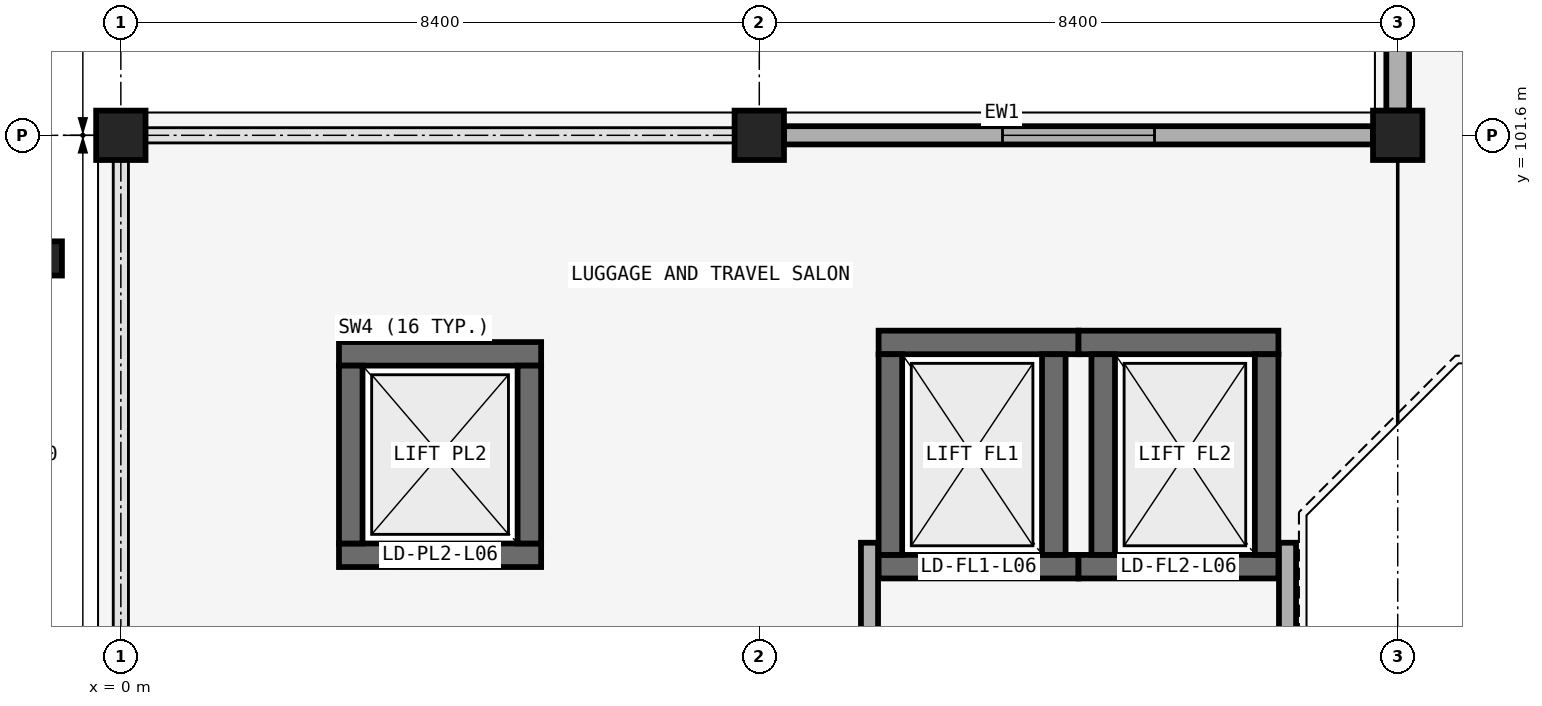
"""IFC4 building model, lengths in metres.
Left out: names, types, materials, properties, quantities, classifications, styles, units other than length and angle.
Written with IfcOpenShell. Run it as: python <this file> out.ifc"""

import sys

from ifc_helpers import new_model, si_unit, direction, frame, frame_2d, origin, origin_2d, place, context, subcontext, project, spatial, rectangle, extrude, element, fill, save


model = new_model("IFC4")
c1 = context("Model", 3, precision=1e-05, world=origin(), true_north=direction((0.0, 1.0)))
c2 = subcontext(c1, "Body", "Model", "MODEL_VIEW")
j1 = project(units=[si_unit("LENGTHUNIT", "METRE"), si_unit("PLANEANGLEUNIT", "RADIAN")], contexts=[c1])
p1 = place(None, origin())
s1 = spatial("IfcSite", under=j1, at=p1, CompositionType="ELEMENT")
p2 = place(p1, origin())
s2 = spatial("IfcBuilding", under=s1, at=p2, CompositionType="ELEMENT")
p3 = place(p2, frame((0.0, 0.0, 27.9)))
s3 = spatial("IfcBuildingStorey", under=s2, at=p3, CompositionType="ELEMENT", Elevation=27.9)
for number, where, z_axis, x_axis in (
    (1, (0.0, 101.6, 0.0), (0.0, 0.0, 1.0), (1.0, 0.0, 0.0)),
    (2, (8.4, 101.6, 0.0), (0.0, 0.0, 1.0), (1.0, 0.0, 0.0)),
    (3, (16.8, 101.6, 0.0), (0.0, 0.0, 1.0), (1.0, 0.0, 0.0)),
):
    element("IfcColumn", number, at=place(p3, frame(where, z_axis=z_axis, x_axis=x_axis)), inside=s3, PredefinedType="COLUMN", context=c2, shape_type="SweptSolid", body=[
        extrude(rectangle(XDim=0.65, YDim=0.65, at=origin_2d()), origin(), (0.0, 0.0, 1.0), 4.5),
    ])
p4 = place(p3, frame((-1.05, 99.98, 0.0), z_axis=(0.0, 0.0, 1.0), x_axis=(0.0, 1.0, 0.0)))
e4 = element("IfcColumn", 4, at=p4, inside=s3, PredefinedType="PILASTER", context=c2, shape_type="SweptSolid", body=[
    extrude(rectangle(XDim=0.45, YDim=0.55, at=origin_2d()), origin(), (0.0, 0.0, 1.0), 4.5),
])
p5 = place(p3, frame((8.725, 101.6, 0.0), z_axis=(0.0, 0.0, 1.0), x_axis=(1.0, 0.0, 0.0)))
e5 = element("IfcWall", 5, at=p5, inside=s3, PredefinedType="SOLIDWALL", context=c2, shape_type="SweptSolid", body=[
    extrude(rectangle(XDim=7.75, YDim=0.24, at=frame_2d((3.875, 0.0))), origin(), (0.0, 0.0, 1.0), 3.45),
])
p6 = place(p5, frame((2.875, 0.0, 0.95)))
e6 = element("IfcOpeningElement", 6, at=p6, cuts=e5, PredefinedType="OPENING", context=c2, shape_type="SweptSolid", body=[
    extrude(rectangle(XDim=2.0, YDim=1.85, at=frame_2d((1.0, 0.925))), frame((0.0, 0.13, 0.0), z_axis=(0.0, -1.0, 0.0), x_axis=(1.0, 0.0, 0.0)), (0.0, 0.0, 1.0), 0.26),
])
p7 = place(p3, frame((16.8, 101.925, 0.0), z_axis=(0.0, 0.0, 1.0), x_axis=(0.0, 1.0, 0.0)))
e7 = element("IfcWall", 7, at=p7, inside=s3, PredefinedType="SOLIDWALL", context=c2, shape_type="SweptSolid", body=[
    extrude(rectangle(XDim=7.75, YDim=0.3, at=frame_2d((3.875, 0.0))), origin(), (0.0, 0.0, 1.0), 3.45),
])
p8 = place(p7, frame((2.8, 0.0, 0.95)))
e8 = element("IfcOpeningElement", 8, at=p8, cuts=e7, PredefinedType="OPENING", context=c2, shape_type="SweptSolid", body=[
    extrude(rectangle(XDim=2.15, YDim=1.6, at=frame_2d((1.075, 0.8))), frame((0.0, 0.16, 0.0), z_axis=(0.0, -1.0, 0.0), x_axis=(1.0, 0.0, 0.0)), (0.0, 0.0, 1.0), 0.32),
])
p9 = place(p3, frame((9.97, 95.925, 0.0), z_axis=(0.0, 0.0, 1.0), x_axis=(1.0, 0.0, 0.0)))
e9 = element("IfcWall", 9, at=p9, inside=s3, PredefinedType="SHEAR", context=c2, shape_type="SweptSolid", body=[
    extrude(rectangle(XDim=2.63, YDim=0.31, at=frame_2d((1.315, 0.0))), origin(), (0.0, 0.0, 1.0), 4.2),
])
p10 = place(p9, frame((0.715, 0.0, 0.0)))
e10 = element("IfcOpeningElement", 10, at=p10, cuts=e9, PredefinedType="OPENING", context=c2, shape_type="SweptSolid", body=[
    extrude(rectangle(XDim=1.2, YDim=2.25, at=frame_2d((0.6, 1.125))), frame((0.0, 0.165, 0.0), z_axis=(0.0, -1.0, 0.0), x_axis=(1.0, 0.0, 0.0)), (0.0, 0.0, 1.0), 0.33),
])
p11 = place(p3, frame((9.97, 98.875, 0.0), z_axis=(0.0, 0.0, 1.0), x_axis=(1.0, 0.0, 0.0)))
e11 = element("IfcWall", 11, at=p11, inside=s3, PredefinedType="SHEAR", context=c2, shape_type="SweptSolid", body=[
    extrude(rectangle(XDim=2.63, YDim=0.31, at=frame_2d((1.315, 0.0))), origin(), (0.0, 0.0, 1.0), 4.2),
])
for number, where, z_axis, x_axis in (
    (12, (10.125, 96.08, 0.0), (0.0, 0.0, 1.0), (0.0, 1.0, 0.0)),
    (13, (12.275, 96.08, 0.0), (0.0, 0.0, 1.0), (0.0, 1.0, 0.0)),
):
    element("IfcWall", number, at=place(p3, frame(where, z_axis=z_axis, x_axis=x_axis)), inside=s3, PredefinedType="SHEAR", context=c2, shape_type="SweptSolid", body=[
        extrude(rectangle(XDim=2.64, YDim=0.31, at=frame_2d((1.32, 0.0))), origin(), (0.0, 0.0, 1.0), 4.2),
    ])
p12 = place(p3, frame((12.6, 95.925, 0.0), z_axis=(0.0, 0.0, 1.0), x_axis=(1.0, 0.0, 0.0)))
e14 = element("IfcWall", 14, at=p12, inside=s3, PredefinedType="SHEAR", context=c2, shape_type="SweptSolid", body=[
    extrude(rectangle(XDim=2.63, YDim=0.31, at=frame_2d((1.315, 0.0))), origin(), (0.0, 0.0, 1.0), 4.2),
])
p13 = place(p12, frame((0.715, 0.0, 0.0)))
e15 = element("IfcOpeningElement", 15, at=p13, cuts=e14, PredefinedType="OPENING", context=c2, shape_type="SweptSolid", body=[
    extrude(rectangle(XDim=1.2, YDim=2.25, at=frame_2d((0.6, 1.125))), frame((0.0, 0.165, 0.0), z_axis=(0.0, -1.0, 0.0), x_axis=(1.0, 0.0, 0.0)), (0.0, 0.0, 1.0), 0.33),
])
p14 = place(p3, frame((12.6, 98.875, 0.0), z_axis=(0.0, 0.0, 1.0), x_axis=(1.0, 0.0, 0.0)))
e16 = element("IfcWall", 16, at=p14, inside=s3, PredefinedType="SHEAR", context=c2, shape_type="SweptSolid", body=[
    extrude(rectangle(XDim=2.63, YDim=0.31, at=frame_2d((1.315, 0.0))), origin(), (0.0, 0.0, 1.0), 4.2),
])
for number, where, z_axis, x_axis in (
    (17, (12.925, 96.08, 0.0), (0.0, 0.0, 1.0), (0.0, 1.0, 0.0)),
    (18, (15.075, 96.08, 0.0), (0.0, 0.0, 1.0), (0.0, 1.0, 0.0)),
):
    element("IfcWall", number, at=place(p3, frame(where, z_axis=z_axis, x_axis=x_axis)), inside=s3, PredefinedType="SHEAR", context=c2, shape_type="SweptSolid", body=[
        extrude(rectangle(XDim=2.64, YDim=0.31, at=frame_2d((1.32, 0.0))), origin(), (0.0, 0.0, 1.0), 4.2),
    ])
p15 = place(p3, frame((2.87, 96.075, 0.0), z_axis=(0.0, 0.0, 1.0), x_axis=(1.0, 0.0, 0.0)))
e19 = element("IfcWall", 19, at=p15, inside=s3, PredefinedType="SHEAR", context=c2, shape_type="SweptSolid", body=[
    extrude(rectangle(XDim=2.66, YDim=0.31, at=frame_2d((1.33, 0.0))), origin(), (0.0, 0.0, 1.0), 4.2),
])
p16 = place(p15, frame((0.78, 0.0, 0.0)))
e20 = element("IfcOpeningElement", 20, at=p16, cuts=e19, PredefinedType="OPENING", context=c2, shape_type="SweptSolid", body=[
    extrude(rectangle(XDim=1.1, YDim=2.2, at=frame_2d((0.55, 1.1))), frame((0.0, 0.165, 0.0), z_axis=(0.0, -1.0, 0.0), x_axis=(1.0, 0.0, 0.0)), (0.0, 0.0, 1.0), 0.33),
])
p17 = place(p3, frame((2.87, 98.725, 0.0), z_axis=(0.0, 0.0, 1.0), x_axis=(1.0, 0.0, 0.0)))
e21 = element("IfcWall", 21, at=p17, inside=s3, PredefinedType="SHEAR", context=c2, shape_type="SweptSolid", body=[
    extrude(rectangle(XDim=2.66, YDim=0.31, at=frame_2d((1.33, 0.0))), origin(), (0.0, 0.0, 1.0), 4.2),
])
for number, where, z_axis, x_axis in (
    (22, (3.025, 96.23, 0.0), (0.0, 0.0, 1.0), (0.0, 1.0, 0.0)),
    (23, (5.375, 96.23, 0.0), (0.0, 0.0, 1.0), (0.0, 1.0, 0.0)),
):
    element("IfcWall", number, at=place(p3, frame(where, z_axis=z_axis, x_axis=x_axis)), inside=s3, PredefinedType="SHEAR", context=c2, shape_type="SweptSolid", body=[
        extrude(rectangle(XDim=2.34, YDim=0.31, at=frame_2d((1.17, 0.0))), origin(), (0.0, 0.0, 1.0), 4.2),
    ])
for number, where, z_axis, x_axis in (
    (24, (9.85, 91.71, 0.0), (0.0, 0.0, 1.0), (0.0, 1.0, 0.0)),
    (25, (15.35, 91.71, 0.0), (0.0, 0.0, 1.0), (0.0, 1.0, 0.0)),
):
    element("IfcWall", number, at=place(p3, frame(where, z_axis=z_axis, x_axis=x_axis)), inside=s3, PredefinedType="PARTITIONING", context=c2, shape_type="SweptSolid", body=[
        extrude(rectangle(XDim=4.53, YDim=0.225, at=frame_2d((2.265, 0.0))), origin(), (0.0, 0.0, 1.0), 3.5),
    ])
p18 = place(p6, origin())
e26 = element("IfcWindow", 26, at=p18, inside=s3, PartitioningType="DOUBLE_PANEL_VERTICAL", PredefinedType="WINDOW", context=c2, shape_type="SweptSolid", body=[
    extrude(rectangle(XDim=2.0, YDim=1.85, at=frame_2d((1.0, 0.925))), frame((0.0, 0.03, 0.0), z_axis=(0.0, -1.0, 0.0), x_axis=(1.0, 0.0, 0.0)), (0.0, 0.0, 1.0), 0.06),
])
fill(e6, e26)
p19 = place(p10, origin())
e27 = element("IfcDoor", 27, at=p19, inside=s3, OperationType="SLIDING_TO_LEFT", PredefinedType="DOOR", context=c2, shape_type="SweptSolid", body=[
    extrude(rectangle(XDim=1.2, YDim=2.25, at=frame_2d((0.6, 1.125))), frame((0.0, 0.025, 0.0), z_axis=(0.0, -1.0, 0.0), x_axis=(1.0, 0.0, 0.0)), (0.0, 0.0, 1.0), 0.05),
])
fill(e10, e27)
p20 = place(p13, origin())
e28 = element("IfcDoor", 28, at=p20, inside=s3, OperationType="SLIDING_TO_LEFT", PredefinedType="DOOR", context=c2, shape_type="SweptSolid", body=[
    extrude(rectangle(XDim=1.2, YDim=2.25, at=frame_2d((0.6, 1.125))), frame((0.0, 0.025, 0.0), z_axis=(0.0, -1.0, 0.0), x_axis=(1.0, 0.0, 0.0)), (0.0, 0.0, 1.0), 0.05),
])
fill(e15, e28)
p21 = place(p16, origin())
e29 = element("IfcDoor", 29, at=p21, inside=s3, OperationType="SLIDING_TO_LEFT", PredefinedType="DOOR", context=c2, shape_type="SweptSolid", body=[
    extrude(rectangle(XDim=1.1, YDim=2.2, at=frame_2d((0.55, 1.1))), frame((0.0, 0.025, 0.0), z_axis=(0.0, -1.0, 0.0), x_axis=(1.0, 0.0, 0.0)), (0.0, 0.0, 1.0), 0.05),
])
fill(e20, e29)
save(model, sys.argv[1])
